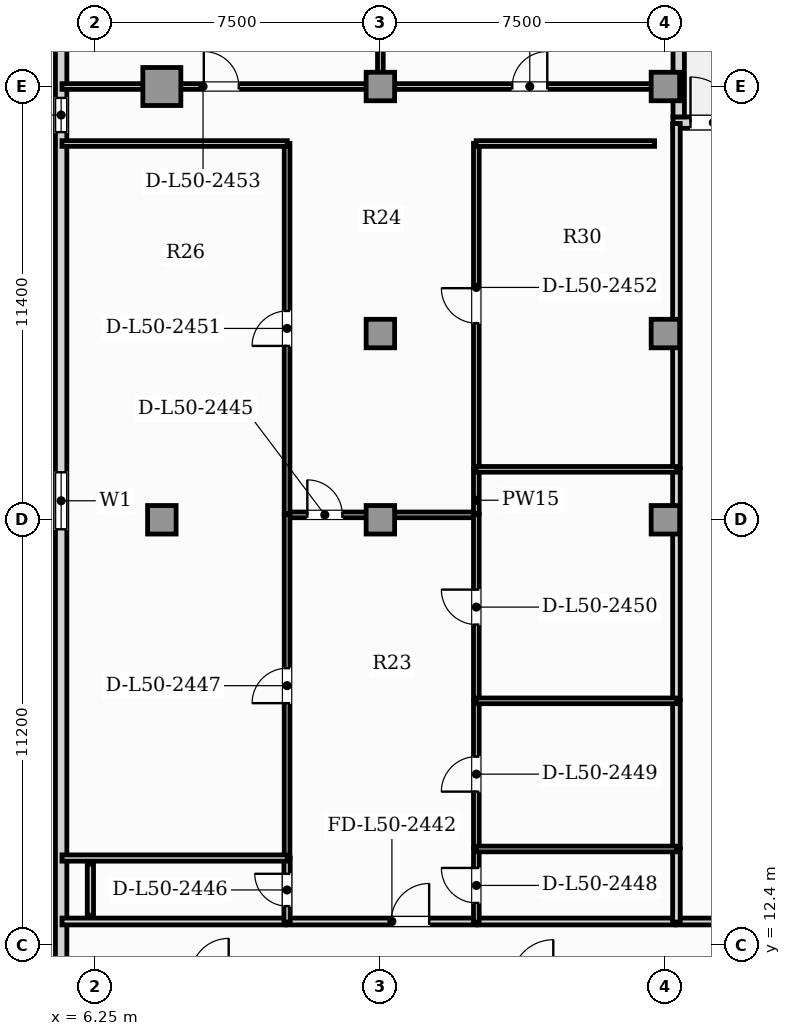
"""IFC4 building model, lengths in metres.
Left out: names, types, materials, properties, quantities, classifications, styles, units other than length and angle.
Written with IfcOpenShell. Run it as: python <this file> out.ifc"""

import sys

from ifc_helpers import new_model, si_unit, direction, frame, frame_2d, origin, origin_2d, place, context, subcontext, project, spatial, rectangle, hollow_rectangle, extrude, element, fill, save


model = new_model("IFC4")
c1 = context("Model", 3, precision=1e-05, world=origin(), true_north=direction((0.0, 1.0)))
c2 = subcontext(c1, "Body", "Model", "MODEL_VIEW")
j1 = project(units=[si_unit("LENGTHUNIT", "METRE"), si_unit("PLANEANGLEUNIT", "RADIAN")], contexts=[c1])
p1 = place(None, origin())
s1 = spatial("IfcSite", under=j1, at=p1, CompositionType="ELEMENT")
p2 = place(p1, origin())
s2 = spatial("IfcBuilding", under=s1, at=p2, CompositionType="ELEMENT")
p3 = place(p2, frame((0.0, 0.0, 204.15)))
s3 = spatial("IfcBuildingStorey", under=s2, at=p3, CompositionType="ELEMENT", Elevation=204.15)
p4 = place(p3, frame((8.0, 35.0, 0.0), z_axis=(0.0, 0.0, 1.0), x_axis=(1.0, 0.0, 0.0)))
e1 = element("IfcColumn", 1, at=p4, inside=s3, PredefinedType="USERDEFINED", context=c2, shape_type="SweptSolid", body=[
    extrude(hollow_rectangle(XDim=1.0, YDim=1.0, WallThickness=0.06, at=origin_2d()), origin(), (0.0, 0.0, 1.0), 3.85),
])
for number, where, z_axis, x_axis in (
    (2, (8.0, 23.6, 0.0), (0.0, 0.0, 1.0), (1.0, 0.0, 0.0)),
    (3, (13.75, 23.6, 0.0), (0.0, 0.0, 1.0), (1.0, 0.0, 0.0)),
    (4, (21.25, 23.6, 0.0), (0.0, 0.0, 1.0), (1.0, 0.0, 0.0)),
    (5, (13.75, 28.5, 0.0), (0.0, 0.0, 1.0), (1.0, 0.0, 0.0)),
    (6, (21.25, 28.5, 0.0), (0.0, 0.0, 1.0), (1.0, 0.0, 0.0)),
    (7, (13.75, 35.0, 0.0), (0.0, 0.0, 1.0), (1.0, 0.0, 0.0)),
    (8, (21.25, 35.0, 0.0), (0.0, 0.0, 1.0), (1.0, 0.0, 0.0)),
):
    element("IfcColumn", number, at=place(p3, frame(where, z_axis=z_axis, x_axis=x_axis)), inside=s3, PredefinedType="COLUMN", context=c2, shape_type="SweptSolid", body=[
        extrude(rectangle(XDim=0.75, YDim=0.75, at=origin_2d()), origin(), (0.0, 0.0, 1.0), 3.85),
    ])
p5 = place(p3, frame((21.45, 34.05, 0.0), z_axis=(0.0, 0.0, 1.0), x_axis=(1.0, 0.0, 0.0)))
e9 = element("IfcWall", 9, at=p5, inside=s3, PredefinedType="SOLIDWALL", context=c2, shape_type="SweptSolid", body=[
    extrude(rectangle(XDim=1.8, YDim=0.3, at=frame_2d((0.9, 0.0))), origin(), (0.0, 0.0, 1.0), 3.63),
])
p6 = place(p5, frame((0.46, 0.0, 0.0)))
e10 = element("IfcOpeningElement", 10, at=p6, cuts=e9, PredefinedType="OPENING", context=c2, shape_type="SweptSolid", body=[
    extrude(rectangle(XDim=1.2, YDim=2.2, at=frame_2d((0.6, 1.1))), frame((0.0, 0.16, 0.0), z_axis=(0.0, -1.0, 0.0), x_axis=(1.0, 0.0, 0.0)), (0.0, 0.0, 1.0), 0.32),
])
p7 = place(p3, frame((21.6, 34.2, 0.0), z_axis=(0.0, 0.0, 1.0), x_axis=(0.0, 1.0, 0.0)))
e11 = element("IfcWall", 11, at=p7, inside=s3, PredefinedType="SOLIDWALL", context=c2, shape_type="SweptSolid", body=[
    extrude(rectangle(XDim=6.16, YDim=0.3, at=frame_2d((3.08, 0.0))), origin(), (0.0, 0.0, 1.0), 3.63),
])
p8 = place(p7, frame((2.33, 0.0, 0.9)))
e12 = element("IfcOpeningElement", 12, at=p8, cuts=e11, PredefinedType="OPENING", context=c2, shape_type="SweptSolid", body=[
    extrude(rectangle(XDim=1.5, YDim=1.95, at=frame_2d((0.75, 0.975))), frame((0.0, 0.16, 0.0), z_axis=(0.0, -1.0, 0.0), x_axis=(1.0, 0.0, 0.0)), (0.0, 0.0, 1.0), 0.32),
])
p9 = place(p3, frame((5.35, 37.16, 0.0), z_axis=(0.0, 0.0, 1.0), x_axis=(0.0, -1.0, 0.0)))
e13 = element("IfcWall", 13, at=p9, inside=s3, PredefinedType="SOLIDWALL", context=c2, shape_type="SweptSolid", body=[
    extrude(rectangle(XDim=33.92, YDim=0.3, at=frame_2d((16.96, 0.0))), origin(), (0.0, 0.0, 1.0), 3.63),
])
p10 = place(p9, frame((2.46, 0.0, 0.95)))
e14 = element("IfcOpeningElement", 14, at=p10, cuts=e13, PredefinedType="OPENING", context=c2, shape_type="SweptSolid", body=[
    extrude(rectangle(XDim=0.9, YDim=1.5, at=frame_2d((0.45, 0.75))), frame((0.0, 0.16, 0.0), z_axis=(0.0, -1.0, 0.0), x_axis=(1.0, 0.0, 0.0)), (0.0, 0.0, 1.0), 0.32),
])
p11 = place(p9, frame((12.31, 0.0, 0.9)))
e15 = element("IfcOpeningElement", 15, at=p11, cuts=e13, PredefinedType="OPENING", context=c2, shape_type="SweptSolid", body=[
    extrude(rectangle(XDim=1.5, YDim=1.95, at=frame_2d((0.75, 0.975))), frame((0.0, 0.16, 0.0), z_axis=(0.0, -1.0, 0.0), x_axis=(1.0, 0.0, 0.0)), (0.0, 0.0, 1.0), 0.32),
])
p12 = place(p3, frame((21.535, 13.03, 0.0), z_axis=(0.0, 0.0, 1.0), x_axis=(1.0, 0.0, 0.0)))
e16 = element("IfcWall", 16, at=p12, inside=s3, PredefinedType="PARTITIONING", context=c2, shape_type="SweptSolid", body=[
    extrude(rectangle(XDim=11.33, YDim=0.18, at=frame_2d((5.665, 0.0))), origin(), (0.0, 0.0, 1.0), 3.63),
])
p13 = place(p12, frame((3.466, 0.0, 0.0)))
e17 = element("IfcOpeningElement", 17, at=p13, cuts=e16, PredefinedType="OPENING", context=c2, shape_type="SweptSolid", body=[
    extrude(rectangle(XDim=1.0, YDim=2.15, at=frame_2d((0.5, 1.075))), frame((0.0, 0.1, 0.0), z_axis=(0.0, -1.0, 0.0), x_axis=(1.0, 0.0, 0.0)), (0.0, 0.0, 1.0), 0.2),
])
p14 = place(p3, frame((11.29, 13.03, 0.0), z_axis=(0.0, 0.0, 1.0), x_axis=(1.0, 0.0, 0.0)))
e18 = element("IfcWall", 18, at=p14, inside=s3, PredefinedType="PARTITIONING", context=c2, shape_type="SweptSolid", body=[
    extrude(rectangle(XDim=4.99, YDim=0.18, at=frame_2d((2.495, 0.0))), origin(), (0.0, 0.0, 1.0), 3.63),
])
p15 = place(p14, frame((2.743, 0.0, 0.0)))
e19 = element("IfcOpeningElement", 19, at=p15, cuts=e18, PredefinedType="OPENING", context=c2, shape_type="SweptSolid", body=[
    extrude(rectangle(XDim=1.0, YDim=2.15, at=frame_2d((0.5, 1.075))), frame((0.0, 0.1, 0.0), z_axis=(0.0, -1.0, 0.0), x_axis=(1.0, 0.0, 0.0)), (0.0, 0.0, 1.0), 0.2),
])
p16 = place(p3, frame((5.373, 13.03, 0.0), z_axis=(0.0, 0.0, 1.0), x_axis=(1.0, 0.0, 0.0)))
e20 = element("IfcWall", 20, at=p16, inside=s3, PredefinedType="PARTITIONING", context=c2, shape_type="SweptSolid", body=[
    extrude(rectangle(XDim=5.887, YDim=0.18, at=frame_2d((2.944, 0.0))), origin(), (0.0, 0.0, 1.0), 3.63),
])
p17 = place(p3, frame((16.31, 13.03, 0.0), z_axis=(0.0, 0.0, 1.0), x_axis=(1.0, 0.0, 0.0)))
e21 = element("IfcWall", 21, at=p17, inside=s3, PredefinedType="PARTITIONING", context=c2, shape_type="SweptSolid", body=[
    extrude(rectangle(XDim=5.195, YDim=0.18, at=frame_2d((2.597, 0.0))), origin(), (0.0, 0.0, 1.0), 3.63),
])
p18 = place(p3, frame((21.54, 13.015, 0.0), z_axis=(0.0, 0.0, 1.0), x_axis=(0.0, 1.0, 0.0)))
e22 = element("IfcWall", 22, at=p18, inside=s3, PredefinedType="PARTITIONING", context=c2, shape_type="SweptSolid", body=[
    extrude(rectangle(XDim=1.928, YDim=0.2, at=frame_2d((0.964, 0.0))), origin(), (0.0, 0.0, 1.0), 3.63),
])
p19 = place(p3, frame((21.54, 14.973, 0.0), z_axis=(0.0, 0.0, 1.0), x_axis=(0.0, 1.0, 0.0)))
e23 = element("IfcWall", 23, at=p19, inside=s3, PredefinedType="PARTITIONING", context=c2, shape_type="SweptSolid", body=[
    extrude(rectangle(XDim=3.868, YDim=0.2, at=frame_2d((1.934, 0.0))), origin(), (0.0, 0.0, 1.0), 3.63),
])
p20 = place(p3, frame((21.54, 18.871, 0.0), z_axis=(0.0, 0.0, 1.0), x_axis=(0.0, 1.0, 0.0)))
e24 = element("IfcWall", 24, at=p20, inside=s3, PredefinedType="PARTITIONING", context=c2, shape_type="SweptSolid", body=[
    extrude(rectangle(XDim=6.061, YDim=0.2, at=frame_2d((3.03, 0.0))), origin(), (0.0, 0.0, 1.0), 3.63),
])
p21 = place(p3, frame((21.54, 24.962, 0.0), z_axis=(0.0, 0.0, 1.0), x_axis=(0.0, 1.0, 0.0)))
e25 = element("IfcWall", 25, at=p21, inside=s3, PredefinedType="PARTITIONING", context=c2, shape_type="SweptSolid", body=[
    extrude(rectangle(XDim=9.066, YDim=0.2, at=frame_2d((4.533, 0.0))), origin(), (0.0, 0.0, 1.0), 3.63),
])
p22 = place(p3, frame((11.29, 23.729, 0.0), z_axis=(0.0, 0.0, 1.0), x_axis=(1.0, 0.0, 0.0)))
e26 = element("IfcWall", 26, at=p22, inside=s3, PredefinedType="PARTITIONING", context=c2, shape_type="SweptSolid", body=[
    extrude(rectangle(XDim=4.99, YDim=0.15, at=frame_2d((2.495, 0.0))), origin(), (0.0, 0.0, 1.0), 3.086),
])
p23 = place(p22, frame((0.538, 0.0, 0.0)))
e27 = element("IfcOpeningElement", 27, at=p23, cuts=e26, PredefinedType="OPENING", context=c2, shape_type="SweptSolid", body=[
    extrude(rectangle(XDim=0.92, YDim=2.1, at=frame_2d((0.46, 1.05))), frame((0.0, 0.085, 0.0), z_axis=(0.0, -1.0, 0.0), x_axis=(1.0, 0.0, 0.0)), (0.0, 0.0, 1.0), 0.17),
])
p24 = place(p3, frame((11.295, 13.015, 0.0), z_axis=(0.0, 0.0, 1.0), x_axis=(0.0, 1.0, 0.0)))
e28 = element("IfcWall", 28, at=p24, inside=s3, PredefinedType="PLUMBINGWALL", context=c2, shape_type="SweptSolid", body=[
    extrude(rectangle(XDim=1.69, YDim=0.165, at=frame_2d((0.845, 0.0))), origin(), (0.0, 0.0, 1.0), 3.63),
])
p25 = place(p24, frame((0.42, 0.0, 0.0)))
e29 = element("IfcOpeningElement", 29, at=p25, cuts=e28, PredefinedType="OPENING", context=c2, shape_type="SweptSolid", body=[
    extrude(rectangle(XDim=0.85, YDim=2.1, at=frame_2d((0.425, 1.05))), frame((0.0, 0.093, 0.0), z_axis=(0.0, -1.0, 0.0), x_axis=(1.0, 0.0, 0.0)), (0.0, 0.0, 1.0), 0.185),
])
p26 = place(p3, frame((11.295, 14.735, 0.0), z_axis=(0.0, 0.0, 1.0), x_axis=(0.0, 1.0, 0.0)))
e30 = element("IfcWall", 30, at=p26, inside=s3, PredefinedType="PARTITIONING", context=c2, shape_type="SweptSolid", body=[
    extrude(rectangle(XDim=8.999, YDim=0.15, at=frame_2d((4.5, 0.0))), origin(), (0.0, 0.0, 1.0), 3.63),
])
p27 = place(p26, frame((4.04, 0.0, 0.0)))
e31 = element("IfcOpeningElement", 31, at=p27, cuts=e30, PredefinedType="OPENING", context=c2, shape_type="SweptSolid", body=[
    extrude(rectangle(XDim=0.92, YDim=2.1, at=frame_2d((0.46, 1.05))), frame((0.0, 0.085, 0.0), z_axis=(0.0, -1.0, 0.0), x_axis=(1.0, 0.0, 0.0)), (0.0, 0.0, 1.0), 0.17),
])
p28 = place(p3, frame((16.275, 13.015, 0.0), z_axis=(0.0, 0.0, 1.0), x_axis=(0.0, 1.0, 0.0)))
e32 = element("IfcWall", 32, at=p28, inside=s3, PredefinedType="PARTITIONING", context=c2, shape_type="SweptSolid", body=[
    extrude(rectangle(XDim=1.928, YDim=0.15, at=frame_2d((0.964, 0.0))), origin(), (0.0, 0.0, 1.0), 3.63),
])
p29 = place(p28, frame((0.504, 0.0, 0.0)))
e33 = element("IfcOpeningElement", 33, at=p29, cuts=e32, PredefinedType="OPENING", context=c2, shape_type="SweptSolid", body=[
    extrude(rectangle(XDim=0.92, YDim=2.1, at=frame_2d((0.46, 1.05))), frame((0.0, 0.085, 0.0), z_axis=(0.0, -1.0, 0.0), x_axis=(1.0, 0.0, 0.0)), (0.0, 0.0, 1.0), 0.17),
])
p30 = place(p3, frame((16.275, 14.973, 0.0), z_axis=(0.0, 0.0, 1.0), x_axis=(0.0, 1.0, 0.0)))
e34 = element("IfcWall", 34, at=p30, inside=s3, PredefinedType="PARTITIONING", context=c2, shape_type="SweptSolid", body=[
    extrude(rectangle(XDim=3.868, YDim=0.15, at=frame_2d((1.934, 0.0))), origin(), (0.0, 0.0, 1.0), 3.63),
])
p31 = place(p30, frame((1.474, 0.0, 0.0)))
e35 = element("IfcOpeningElement", 35, at=p31, cuts=e34, PredefinedType="OPENING", context=c2, shape_type="SweptSolid", body=[
    extrude(rectangle(XDim=0.92, YDim=2.1, at=frame_2d((0.46, 1.05))), frame((0.0, 0.085, 0.0), z_axis=(0.0, -1.0, 0.0), x_axis=(1.0, 0.0, 0.0)), (0.0, 0.0, 1.0), 0.17),
])
p32 = place(p3, frame((16.275, 18.871, 0.0), z_axis=(0.0, 0.0, 1.0), x_axis=(0.0, 1.0, 0.0)))
e36 = element("IfcWall", 36, at=p32, inside=s3, PredefinedType="PARTITIONING", context=c2, shape_type="SweptSolid", body=[
    extrude(rectangle(XDim=4.863, YDim=0.15, at=frame_2d((2.432, 0.0))), origin(), (0.0, 0.0, 1.0), 3.63),
])
p33 = place(p32, frame((1.971, 0.0, 0.0)))
e37 = element("IfcOpeningElement", 37, at=p33, cuts=e36, PredefinedType="OPENING", context=c2, shape_type="SweptSolid", body=[
    extrude(rectangle(XDim=0.92, YDim=2.1, at=frame_2d((0.46, 1.05))), frame((0.0, 0.085, 0.0), z_axis=(0.0, -1.0, 0.0), x_axis=(1.0, 0.0, 0.0)), (0.0, 0.0, 1.0), 0.17),
])
p34 = place(p3, frame((11.295, 23.764, 0.0), z_axis=(0.0, 0.0, 1.0), x_axis=(0.0, 1.0, 0.0)))
e38 = element("IfcWall", 38, at=p34, inside=s3, PredefinedType="PARTITIONING", context=c2, shape_type="SweptSolid", body=[
    extrude(rectangle(XDim=9.741, YDim=0.15, at=frame_2d((4.87, 0.0))), origin(), (0.0, 0.0, 1.0), 3.63),
])
p35 = place(p34, frame((4.41, 0.0, 0.0)))
e39 = element("IfcOpeningElement", 39, at=p35, cuts=e38, PredefinedType="OPENING", context=c2, shape_type="SweptSolid", body=[
    extrude(rectangle(XDim=0.92, YDim=2.1, at=frame_2d((0.46, 1.05))), frame((0.0, 0.085, 0.0), z_axis=(0.0, -1.0, 0.0), x_axis=(1.0, 0.0, 0.0)), (0.0, 0.0, 1.0), 0.17),
])
p36 = place(p3, frame((5.373, 33.5, 0.0), z_axis=(0.0, 0.0, 1.0), x_axis=(1.0, 0.0, 0.0)))
e40 = element("IfcWall", 40, at=p36, inside=s3, PredefinedType="PARTITIONING", context=c2, shape_type="SweptSolid", body=[
    extrude(rectangle(XDim=5.927, YDim=0.15, at=frame_2d((2.964, 0.0))), origin(), (0.0, 0.0, 1.0), 3.63),
])
p37 = place(p3, frame((16.275, 23.764, 0.0), z_axis=(0.0, 0.0, 1.0), x_axis=(0.0, 1.0, 0.0)))
e41 = element("IfcWall", 41, at=p37, inside=s3, PredefinedType="PARTITIONING", context=c2, shape_type="SweptSolid", body=[
    extrude(rectangle(XDim=1.168, YDim=0.15, at=frame_2d((0.584, 0.0))), origin(), (0.0, 0.0, 1.0), 3.63),
])
p38 = place(p3, frame((16.275, 24.962, 0.0), z_axis=(0.0, 0.0, 1.0), x_axis=(0.0, 1.0, 0.0)))
e42 = element("IfcWall", 42, at=p38, inside=s3, PredefinedType="PARTITIONING", context=c2, shape_type="SweptSolid", body=[
    extrude(rectangle(XDim=8.543, YDim=0.15, at=frame_2d((4.271, 0.0))), origin(), (0.0, 0.0, 1.0), 3.63),
])
p39 = place(p38, frame((3.812, 0.0, 0.0)))
e43 = element("IfcOpeningElement", 43, at=p39, cuts=e42, PredefinedType="OPENING", context=c2, shape_type="SweptSolid", body=[
    extrude(rectangle(XDim=0.92, YDim=2.1, at=frame_2d((0.46, 1.05))), frame((0.0, 0.085, 0.0), z_axis=(0.0, -1.0, 0.0), x_axis=(1.0, 0.0, 0.0)), (0.0, 0.0, 1.0), 0.17),
])
p40 = place(p3, frame((16.27, 33.5, 0.0), z_axis=(0.0, 0.0, 1.0), x_axis=(1.0, 0.0, 0.0)))
e44 = element("IfcWall", 44, at=p40, inside=s3, PredefinedType="PARTITIONING", context=c2, shape_type="SweptSolid", body=[
    extrude(rectangle(XDim=4.695, YDim=0.15, at=frame_2d((2.348, 0.0))), origin(), (0.0, 0.0, 1.0), 3.63),
])
p41 = place(p3, frame((5.373, 35.0, 0.0), z_axis=(0.0, 0.0, 1.0), x_axis=(1.0, 0.0, 0.0)))
e45 = element("IfcWall", 45, at=p41, inside=s3, PredefinedType="PARTITIONING", context=c2, shape_type="SweptSolid", body=[
    extrude(rectangle(XDim=8.382, YDim=0.15, at=frame_2d((4.191, 0.0))), origin(), (0.0, 0.0, 1.0), 3.086),
])
p42 = place(p41, frame((3.731, 0.0, 0.0)))
e46 = element("IfcOpeningElement", 46, at=p42, cuts=e45, PredefinedType="OPENING", context=c2, shape_type="SweptSolid", body=[
    extrude(rectangle(XDim=0.92, YDim=2.1, at=frame_2d((0.46, 1.05))), frame((0.0, 0.085, 0.0), z_axis=(0.0, -1.0, 0.0), x_axis=(1.0, 0.0, 0.0)), (0.0, 0.0, 1.0), 0.17),
])
p43 = place(p3, frame((13.785, 35.0, 0.0), z_axis=(0.0, 0.0, 1.0), x_axis=(1.0, 0.0, 0.0)))
e47 = element("IfcWall", 47, at=p43, inside=s3, PredefinedType="PARTITIONING", context=c2, shape_type="SweptSolid", body=[
    extrude(rectangle(XDim=7.792, YDim=0.15, at=frame_2d((3.896, 0.0))), origin(), (0.0, 0.0, 1.0), 3.086),
])
p44 = place(p43, frame((3.436, 0.0, 0.0)))
e48 = element("IfcOpeningElement", 48, at=p44, cuts=e47, PredefinedType="OPENING", context=c2, shape_type="SweptSolid", body=[
    extrude(rectangle(XDim=0.92, YDim=2.1, at=frame_2d((0.46, 1.05))), frame((0.0, 0.085, 0.0), z_axis=(0.0, -1.0, 0.0), x_axis=(1.0, 0.0, 0.0)), (0.0, 0.0, 1.0), 0.17),
])
p45 = place(p3, frame((5.373, 14.7, 0.0), z_axis=(0.0, 0.0, 1.0), x_axis=(1.0, 0.0, 0.0)))
e49 = element("IfcWall", 49, at=p45, inside=s3, PredefinedType="PLUMBINGWALL", context=c2, shape_type="SweptSolid", body=[
    extrude(rectangle(XDim=5.927, YDim=0.165, at=frame_2d((2.964, 0.0))), origin(), (0.0, 0.0, 1.0), 3.63),
])
for number, where, z_axis, x_axis in (
    (50, (16.27, 14.938, 0.0), (0.0, 0.0, 1.0), (1.0, 0.0, 0.0)),
    (51, (16.27, 18.836, 0.0), (0.0, 0.0, 1.0), (1.0, 0.0, 0.0)),
    (52, (16.27, 24.927, 0.0), (0.0, 0.0, 1.0), (1.0, 0.0, 0.0)),
):
    element("IfcWall", number, at=place(p3, frame(where, z_axis=z_axis, x_axis=x_axis)), inside=s3, PredefinedType="PARTITIONING", context=c2, shape_type="SweptSolid", body=[
        extrude(rectangle(XDim=5.275, YDim=0.15, at=frame_2d((2.637, 0.0))), origin(), (0.0, 0.0, 1.0), 3.63),
    ])
p46 = place(p3, frame((13.75, 34.995, 0.0), z_axis=(0.0, 0.0, 1.0), x_axis=(0.0, 1.0, 0.0)))
e53 = element("IfcWall", 53, at=p46, inside=s3, PredefinedType="PARTITIONING", context=c2, shape_type="SweptSolid", body=[
    extrude(rectangle(XDim=5.232, YDim=0.15, at=frame_2d((2.616, 0.0))), origin(), (0.0, 0.0, 1.0), 3.63),
])
p47 = place(p3, frame((6.12, 13.195, 0.0), z_axis=(0.0, 0.0, 1.0), x_axis=(0.0, 1.0, 0.0)))
e54 = element("IfcWall", 54, at=p47, inside=s3, PredefinedType="PLUMBINGWALL", context=c2, shape_type="SweptSolid", body=[
    extrude(rectangle(XDim=1.34, YDim=0.165, at=frame_2d((0.67, 0.0))), origin(), (0.0, 0.0, 1.0), 3.63),
])
p48 = place(p6, origin())
e55 = element("IfcDoor", 55, at=p48, inside=s3, OperationType="SINGLE_SWING_LEFT", PredefinedType="DOOR", context=c2, shape_type="SweptSolid", body=[
    extrude(rectangle(XDim=1.2, YDim=2.2, at=frame_2d((0.6, 1.1))), frame((0.0, 0.025, 0.0), z_axis=(0.0, -1.0, 0.0), x_axis=(1.0, 0.0, 0.0)), (0.0, 0.0, 1.0), 0.05),
])
fill(e10, e55)
p49 = place(p10, origin())
e56 = element("IfcWindow", 56, at=p49, inside=s3, PartitioningType="SINGLE_PANEL", PredefinedType="WINDOW", context=c2, shape_type="SweptSolid", body=[
    extrude(rectangle(XDim=0.9, YDim=1.5, at=frame_2d((0.45, 0.75))), frame((0.0, 0.03, 0.0), z_axis=(0.0, -1.0, 0.0), x_axis=(1.0, 0.0, 0.0)), (0.0, 0.0, 1.0), 0.06),
])
fill(e14, e56)
p50 = place(p11, origin())
e57 = element("IfcWindow", 57, at=p50, inside=s3, PartitioningType="SINGLE_PANEL", PredefinedType="WINDOW", context=c2, shape_type="SweptSolid", body=[
    extrude(rectangle(XDim=1.5, YDim=1.95, at=frame_2d((0.75, 0.975))), frame((0.0, 0.03, 0.0), z_axis=(0.0, -1.0, 0.0), x_axis=(1.0, 0.0, 0.0)), (0.0, 0.0, 1.0), 0.06),
])
fill(e15, e57)
p51 = place(p15, origin())
e58 = element("IfcDoor", 58, at=p51, inside=s3, OperationType="SINGLE_SWING_RIGHT", PredefinedType="DOOR", context=c2, shape_type="SweptSolid", body=[
    extrude(rectangle(XDim=1.0, YDim=2.15, at=frame_2d((0.5, 1.075))), frame((0.0, 0.025, 0.0), z_axis=(0.0, -1.0, 0.0), x_axis=(1.0, 0.0, 0.0)), (0.0, 0.0, 1.0), 0.05),
])
fill(e19, e58)
p52 = place(p23, origin())
e59 = element("IfcDoor", 59, at=p52, inside=s3, OperationType="SINGLE_SWING_LEFT", PredefinedType="DOOR", context=c2, shape_type="SweptSolid", body=[
    extrude(rectangle(XDim=0.92, YDim=2.1, at=frame_2d((0.46, 1.05))), frame((0.0, 0.025, 0.0), z_axis=(0.0, -1.0, 0.0), x_axis=(1.0, 0.0, 0.0)), (0.0, 0.0, 1.0), 0.05),
])
fill(e27, e59)
p53 = place(p25, origin())
e60 = element("IfcDoor", 60, at=p53, inside=s3, OperationType="SINGLE_SWING_RIGHT", PredefinedType="DOOR", context=c2, shape_type="SweptSolid", body=[
    extrude(rectangle(XDim=0.85, YDim=2.1, at=frame_2d((0.425, 1.05))), frame((0.0, 0.025, 0.0), z_axis=(0.0, -1.0, 0.0), x_axis=(1.0, 0.0, 0.0)), (0.0, 0.0, 1.0), 0.05),
])
fill(e29, e60)
p54 = place(p27, origin())
e61 = element("IfcDoor", 61, at=p54, inside=s3, OperationType="SINGLE_SWING_LEFT", PredefinedType="DOOR", context=c2, shape_type="SweptSolid", body=[
    extrude(rectangle(XDim=0.92, YDim=2.1, at=frame_2d((0.46, 1.05))), frame((0.0, 0.025, 0.0), z_axis=(0.0, -1.0, 0.0), x_axis=(1.0, 0.0, 0.0)), (0.0, 0.0, 1.0), 0.05),
])
fill(e31, e61)
p55 = place(p29, origin())
e62 = element("IfcDoor", 62, at=p55, inside=s3, OperationType="SINGLE_SWING_RIGHT", PredefinedType="DOOR", context=c2, shape_type="SweptSolid", body=[
    extrude(rectangle(XDim=0.92, YDim=2.1, at=frame_2d((0.46, 1.05))), frame((0.0, 0.025, 0.0), z_axis=(0.0, -1.0, 0.0), x_axis=(1.0, 0.0, 0.0)), (0.0, 0.0, 1.0), 0.05),
])
fill(e33, e62)
p56 = place(p31, origin())
e63 = element("IfcDoor", 63, at=p56, inside=s3, OperationType="SINGLE_SWING_LEFT", PredefinedType="DOOR", context=c2, shape_type="SweptSolid", body=[
    extrude(rectangle(XDim=0.92, YDim=2.1, at=frame_2d((0.46, 1.05))), frame((0.0, 0.025, 0.0), z_axis=(0.0, -1.0, 0.0), x_axis=(1.0, 0.0, 0.0)), (0.0, 0.0, 1.0), 0.05),
])
fill(e35, e63)
p57 = place(p33, origin())
e64 = element("IfcDoor", 64, at=p57, inside=s3, OperationType="SINGLE_SWING_RIGHT", PredefinedType="DOOR", context=c2, shape_type="SweptSolid", body=[
    extrude(rectangle(XDim=0.92, YDim=2.1, at=frame_2d((0.46, 1.05))), frame((0.0, 0.025, 0.0), z_axis=(0.0, -1.0, 0.0), x_axis=(1.0, 0.0, 0.0)), (0.0, 0.0, 1.0), 0.05),
])
fill(e37, e64)
p58 = place(p35, origin())
e65 = element("IfcDoor", 65, at=p58, inside=s3, OperationType="SINGLE_SWING_LEFT", PredefinedType="DOOR", context=c2, shape_type="SweptSolid", body=[
    extrude(rectangle(XDim=0.92, YDim=2.1, at=frame_2d((0.46, 1.05))), frame((0.0, 0.025, 0.0), z_axis=(0.0, -1.0, 0.0), x_axis=(1.0, 0.0, 0.0)), (0.0, 0.0, 1.0), 0.05),
])
fill(e39, e65)
p59 = place(p39, origin())
e66 = element("IfcDoor", 66, at=p59, inside=s3, OperationType="SINGLE_SWING_RIGHT", PredefinedType="DOOR", context=c2, shape_type="SweptSolid", body=[
    extrude(rectangle(XDim=0.92, YDim=2.1, at=frame_2d((0.46, 1.05))), frame((0.0, 0.025, 0.0), z_axis=(0.0, -1.0, 0.0), x_axis=(1.0, 0.0, 0.0)), (0.0, 0.0, 1.0), 0.05),
])
fill(e43, e66)
p60 = place(p42, origin())
e67 = element("IfcDoor", 67, at=p60, inside=s3, OperationType="SINGLE_SWING_LEFT", PredefinedType="DOOR", context=c2, shape_type="SweptSolid", body=[
    extrude(rectangle(XDim=0.92, YDim=2.1, at=frame_2d((0.46, 1.05))), frame((0.0, 0.025, 0.0), z_axis=(0.0, -1.0, 0.0), x_axis=(1.0, 0.0, 0.0)), (0.0, 0.0, 1.0), 0.05),
])
fill(e46, e67)
p61 = place(p44, origin())
e68 = element("IfcDoor", 68, at=p61, inside=s3, OperationType="SINGLE_SWING_RIGHT", PredefinedType="DOOR", context=c2, shape_type="SweptSolid", body=[
    extrude(rectangle(XDim=0.92, YDim=2.1, at=frame_2d((0.46, 1.05))), frame((0.0, 0.025, 0.0), z_axis=(0.0, -1.0, 0.0), x_axis=(1.0, 0.0, 0.0)), (0.0, 0.0, 1.0), 0.05),
])
fill(e48, e68)
save(model, sys.argv[1])
